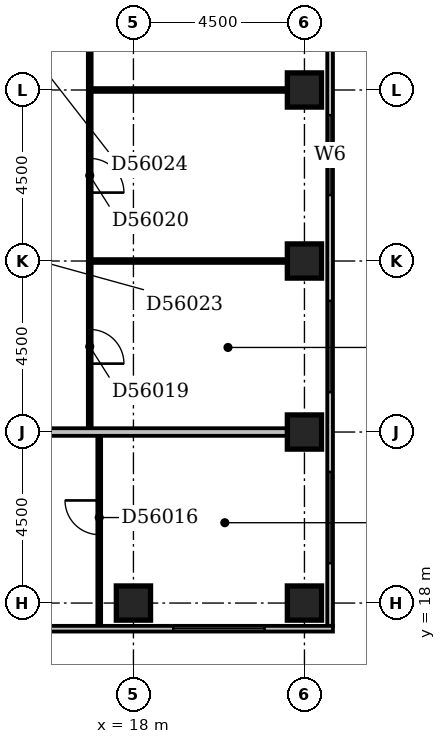
"""IFC4 building model, lengths in metres.
Left out: names, types, materials, properties, quantities, classifications, styles, units other than length and angle.
Written with IfcOpenShell. Run it as: python <this file> out.ifc"""

import sys

from ifc_helpers import new_model, si_unit, direction, frame, frame_2d, origin, origin_2d, place, context, subcontext, project, spatial, rectangle, extrude, element, fill, save


model = new_model("IFC4")
c1 = context("Model", 3, precision=1e-05, world=origin(), true_north=direction((0.0, 1.0)))
c2 = subcontext(c1, "Body", "Model", "MODEL_VIEW")
j1 = project(units=[si_unit("LENGTHUNIT", "METRE"), si_unit("PLANEANGLEUNIT", "RADIAN")], contexts=[c1])
p1 = place(None, origin())
s1 = spatial("IfcSite", under=j1, at=p1, CompositionType="ELEMENT")
p2 = place(p1, origin())
s2 = spatial("IfcBuilding", under=s1, at=p2, CompositionType="ELEMENT")
p3 = place(p2, frame((0.0, 0.0, 218.6)))
s3 = spatial("IfcBuildingStorey", under=s2, at=p3, CompositionType="ELEMENT", Elevation=218.6)
for number, where, z_axis, x_axis in (
    (1, (18.0, 18.0, -0.3), (0.0, 0.0, 1.0), (1.0, 0.0, 0.0)),
    (2, (22.5, 18.0, -0.3), (0.0, 0.0, 1.0), (1.0, 0.0, 0.0)),
    (3, (22.5, 22.5, -0.3), (0.0, 0.0, 1.0), (1.0, 0.0, 0.0)),
    (4, (22.5, 27.0, -0.3), (0.0, 0.0, 1.0), (1.0, 0.0, 0.0)),
    (5, (22.5, 31.5, -0.3), (0.0, 0.0, 1.0), (1.0, 0.0, 0.0)),
):
    element("IfcColumn", number, at=place(p3, frame(where, z_axis=z_axis, x_axis=x_axis)), inside=s3, PredefinedType="COLUMN", context=c2, shape_type="SweptSolid", body=[
        extrude(rectangle(XDim=0.9, YDim=0.9, at=origin_2d()), origin(), (0.0, 0.0, 1.0), 3.6),
    ])
p4 = place(p3, frame((3.9, 17.325, 0.0), z_axis=(0.0, 0.0, 1.0), x_axis=(1.0, 0.0, 0.0)))
e6 = element("IfcWall", 6, at=p4, inside=s3, PredefinedType="STANDARD", context=c2, shape_type="SweptSolid", body=[
    extrude(rectangle(XDim=19.35, YDim=0.15, at=frame_2d((9.675, 0.0))), origin(), (0.0, 0.0, 1.0), 2.7),
])
p5 = place(p4, frame((15.15, 0.0, 0.6)))
e7 = element("IfcOpeningElement", 7, at=p5, cuts=e6, PredefinedType="OPENING", context=c2, shape_type="SweptSolid", body=[
    extrude(rectangle(XDim=2.4, YDim=1.8, at=frame_2d((1.2, 0.9))), frame((0.0, 0.087, 0.0), z_axis=(0.0, -1.0, 0.0), x_axis=(1.0, 0.0, 0.0)), (0.0, 0.0, 1.0), 0.174),
])
p6 = place(p3, frame((23.175, 17.4, 0.0), z_axis=(0.0, 0.0, 1.0), x_axis=(0.0, 1.0, 0.0)))
e8 = element("IfcWall", 8, at=p6, inside=s3, PredefinedType="STANDARD", context=c2, shape_type="SweptSolid", body=[
    extrude(rectangle(XDim=17.85, YDim=0.15, at=frame_2d((8.925, 0.0))), origin(), (0.0, 0.0, 1.0), 2.7),
])
p7 = place(p6, frame((1.65, 0.0, 0.6)))
e9 = element("IfcOpeningElement", 9, at=p7, cuts=e8, PredefinedType="OPENING", context=c2, shape_type="SweptSolid", body=[
    extrude(rectangle(XDim=2.4, YDim=1.8, at=frame_2d((1.2, 0.9))), frame((0.0, 0.087, 0.0), z_axis=(0.0, -1.0, 0.0), x_axis=(1.0, 0.0, 0.0)), (0.0, 0.0, 1.0), 0.174),
])
p8 = place(p6, frame((6.15, 0.0, 0.6)))
e10 = element("IfcOpeningElement", 10, at=p8, cuts=e8, PredefinedType="OPENING", context=c2, shape_type="SweptSolid", body=[
    extrude(rectangle(XDim=2.4, YDim=1.8, at=frame_2d((1.2, 0.9))), frame((0.0, 0.087, 0.0), z_axis=(0.0, -1.0, 0.0), x_axis=(1.0, 0.0, 0.0)), (0.0, 0.0, 1.0), 0.174),
])
p9 = place(p6, frame((11.337, 0.0, 0.6)))
e11 = element("IfcOpeningElement", 11, at=p9, cuts=e8, PredefinedType="OPENING", context=c2, shape_type="SweptSolid", body=[
    extrude(rectangle(XDim=2.1, YDim=1.8, at=frame_2d((1.05, 0.9))), frame((0.0, 0.087, 0.0), z_axis=(0.0, -1.0, 0.0), x_axis=(1.0, 0.0, 0.0)), (0.0, 0.0, 1.0), 0.174),
])
p10 = place(p6, frame((15.15, 0.0, 0.6)))
e12 = element("IfcOpeningElement", 12, at=p10, cuts=e8, PredefinedType="OPENING", context=c2, shape_type="SweptSolid", body=[
    extrude(rectangle(XDim=2.4, YDim=1.8, at=frame_2d((1.2, 0.9))), frame((0.0, 0.087, 0.0), z_axis=(0.0, -1.0, 0.0), x_axis=(1.0, 0.0, 0.0)), (0.0, 0.0, 1.0), 0.174),
])
p11 = place(p3, frame((17.1, 17.4, 0.0), z_axis=(0.0, 0.0, 1.0), x_axis=(0.0, 1.0, 0.0)))
e13 = element("IfcWall", 13, at=p11, inside=s3, PredefinedType="PARTITIONING", context=c2, shape_type="SweptSolid", body=[
    extrude(rectangle(XDim=5.0, YDim=0.1, at=frame_2d((2.5, 0.0))), origin(), (0.0, 0.0, 1.0), 3.3),
])
p12 = place(p11, frame((2.4, 0.0, 0.0)))
e14 = element("IfcOpeningElement", 14, at=p12, cuts=e13, PredefinedType="OPENING", context=c2, shape_type="SweptSolid", body=[
    extrude(rectangle(XDim=0.9, YDim=2.1, at=frame_2d((0.45, 1.05))), frame((0.0, 0.062, 0.0), z_axis=(0.0, -1.0, 0.0), x_axis=(1.0, 0.0, 0.0)), (0.0, 0.0, 1.0), 0.124),
])
p13 = place(p3, frame((9.1, 22.5, 0.0), z_axis=(0.0, 0.0, 1.0), x_axis=(1.0, 0.0, 0.0)))
e15 = element("IfcWall", 15, at=p13, inside=s3, PredefinedType="PARTITIONING", context=c2, shape_type="SweptSolid", body=[
    extrude(rectangle(XDim=12.95, YDim=0.2, at=frame_2d((6.475, 0.0))), origin(), (0.0, 0.0, 1.0), 3.3),
])
p14 = place(p3, frame((16.85, 22.6, 0.0), z_axis=(0.0, 0.0, 1.0), x_axis=(0.0, 1.0, 0.0)))
e16 = element("IfcWall", 16, at=p14, inside=s3, PredefinedType="PARTITIONING", context=c2, shape_type="SweptSolid", body=[
    extrude(rectangle(XDim=13.3, YDim=0.1, at=frame_2d((6.65, 0.0))), origin(), (0.0, 0.0, 1.0), 3.3),
])
p15 = place(p14, frame((1.7, 0.0, 0.0)))
e17 = element("IfcOpeningElement", 17, at=p15, cuts=e16, PredefinedType="OPENING", context=c2, shape_type="SweptSolid", body=[
    extrude(rectangle(XDim=0.9, YDim=2.1, at=frame_2d((0.45, 1.05))), frame((0.0, 0.062, 0.0), z_axis=(0.0, -1.0, 0.0), x_axis=(1.0, 0.0, 0.0)), (0.0, 0.0, 1.0), 0.124),
])
p16 = place(p14, frame((6.2, 0.0, 0.0)))
e18 = element("IfcOpeningElement", 18, at=p16, cuts=e16, PredefinedType="OPENING", context=c2, shape_type="SweptSolid", body=[
    extrude(rectangle(XDim=0.9, YDim=2.1, at=frame_2d((0.45, 1.05))), frame((0.0, 0.062, 0.0), z_axis=(0.0, -1.0, 0.0), x_axis=(1.0, 0.0, 0.0)), (0.0, 0.0, 1.0), 0.124),
])
p17 = place(p14, frame((10.7, 0.0, 0.0)))
e19 = element("IfcOpeningElement", 19, at=p17, cuts=e16, PredefinedType="OPENING", context=c2, shape_type="SweptSolid", body=[
    extrude(rectangle(XDim=0.9, YDim=2.1, at=frame_2d((0.45, 1.05))), frame((0.0, 0.062, 0.0), z_axis=(0.0, -1.0, 0.0), x_axis=(1.0, 0.0, 0.0)), (0.0, 0.0, 1.0), 0.124),
])
p18 = place(p3, frame((16.9, 27.0, 0.0), z_axis=(0.0, 0.0, 1.0), x_axis=(1.0, 0.0, 0.0)))
e20 = element("IfcWall", 20, at=p18, inside=s3, PredefinedType="PARTITIONING", context=c2, shape_type="SweptSolid", body=[
    extrude(rectangle(XDim=5.15, YDim=0.1, at=frame_2d((2.575, 0.0))), origin(), (0.0, 0.0, 1.0), 2.7),
])
p19 = place(p3, frame((16.9, 31.5, 0.0), z_axis=(0.0, 0.0, 1.0), x_axis=(1.0, 0.0, 0.0)))
e21 = element("IfcWall", 21, at=p19, inside=s3, PredefinedType="PARTITIONING", context=c2, shape_type="SweptSolid", body=[
    extrude(rectangle(XDim=5.15, YDim=0.1, at=frame_2d((2.575, 0.0))), origin(), (0.0, 0.0, 1.0), 3.3),
])
p20 = place(p5, origin())
e22 = element("IfcWindow", 22, at=p20, inside=s3, PartitioningType="SINGLE_PANEL", PredefinedType="WINDOW", context=c2, shape_type="SweptSolid", body=[
    extrude(rectangle(XDim=2.4, YDim=1.8, at=frame_2d((1.2, 0.9))), frame((0.0, 0.03, 0.0), z_axis=(0.0, -1.0, 0.0), x_axis=(1.0, 0.0, 0.0)), (0.0, 0.0, 1.0), 0.06),
])
fill(e7, e22)
p21 = place(p7, origin())
e23 = element("IfcWindow", 23, at=p21, inside=s3, PartitioningType="SINGLE_PANEL", PredefinedType="WINDOW", context=c2, shape_type="SweptSolid", body=[
    extrude(rectangle(XDim=2.4, YDim=1.8, at=frame_2d((1.2, 0.9))), frame((0.0, 0.03, 0.0), z_axis=(0.0, -1.0, 0.0), x_axis=(1.0, 0.0, 0.0)), (0.0, 0.0, 1.0), 0.06),
])
fill(e9, e23)
p22 = place(p8, origin())
e24 = element("IfcWindow", 24, at=p22, inside=s3, PartitioningType="SINGLE_PANEL", PredefinedType="WINDOW", context=c2, shape_type="SweptSolid", body=[
    extrude(rectangle(XDim=2.4, YDim=1.8, at=frame_2d((1.2, 0.9))), frame((0.0, 0.03, 0.0), z_axis=(0.0, -1.0, 0.0), x_axis=(1.0, 0.0, 0.0)), (0.0, 0.0, 1.0), 0.06),
])
fill(e10, e24)
p23 = place(p9, origin())
e25 = element("IfcWindow", 25, at=p23, inside=s3, PartitioningType="SINGLE_PANEL", PredefinedType="WINDOW", context=c2, shape_type="SweptSolid", body=[
    extrude(rectangle(XDim=2.1, YDim=1.8, at=frame_2d((1.05, 0.9))), frame((0.0, 0.03, 0.0), z_axis=(0.0, -1.0, 0.0), x_axis=(1.0, 0.0, 0.0)), (0.0, 0.0, 1.0), 0.06),
])
fill(e11, e25)
p24 = place(p12, frame((0.9, 0.0, 0.0), z_axis=(0.0, 0.0, 1.0), x_axis=(-1.0, 0.0, 0.0)))
e26 = element("IfcDoor", 26, at=p24, inside=s3, OperationType="SINGLE_SWING_LEFT", PredefinedType="DOOR", context=c2, shape_type="SweptSolid", body=[
    extrude(rectangle(XDim=0.9, YDim=2.1, at=frame_2d((0.45, 1.05))), frame((0.0, 0.025, 0.0), z_axis=(0.0, -1.0, 0.0), x_axis=(1.0, 0.0, 0.0)), (0.0, 0.0, 1.0), 0.05),
])
fill(e14, e26)
p25 = place(p15, frame((0.9, 0.0, 0.0), z_axis=(0.0, 0.0, 1.0), x_axis=(-1.0, 0.0, 0.0)))
e27 = element("IfcDoor", 27, at=p25, inside=s3, OperationType="SINGLE_SWING_RIGHT", PredefinedType="DOOR", context=c2, shape_type="SweptSolid", body=[
    extrude(rectangle(XDim=0.9, YDim=2.1, at=frame_2d((0.45, 1.05))), frame((0.0, 0.025, 0.0), z_axis=(0.0, -1.0, 0.0), x_axis=(1.0, 0.0, 0.0)), (0.0, 0.0, 1.0), 0.05),
])
fill(e17, e27)
p26 = place(p16, frame((0.9, 0.0, 0.0), z_axis=(0.0, 0.0, 1.0), x_axis=(-1.0, 0.0, 0.0)))
e28 = element("IfcDoor", 28, at=p26, inside=s3, OperationType="SINGLE_SWING_RIGHT", PredefinedType="DOOR", context=c2, shape_type="SweptSolid", body=[
    extrude(rectangle(XDim=0.9, YDim=2.1, at=frame_2d((0.45, 1.05))), frame((0.0, 0.025, 0.0), z_axis=(0.0, -1.0, 0.0), x_axis=(1.0, 0.0, 0.0)), (0.0, 0.0, 1.0), 0.05),
])
fill(e18, e28)
save(model, sys.argv[1])
